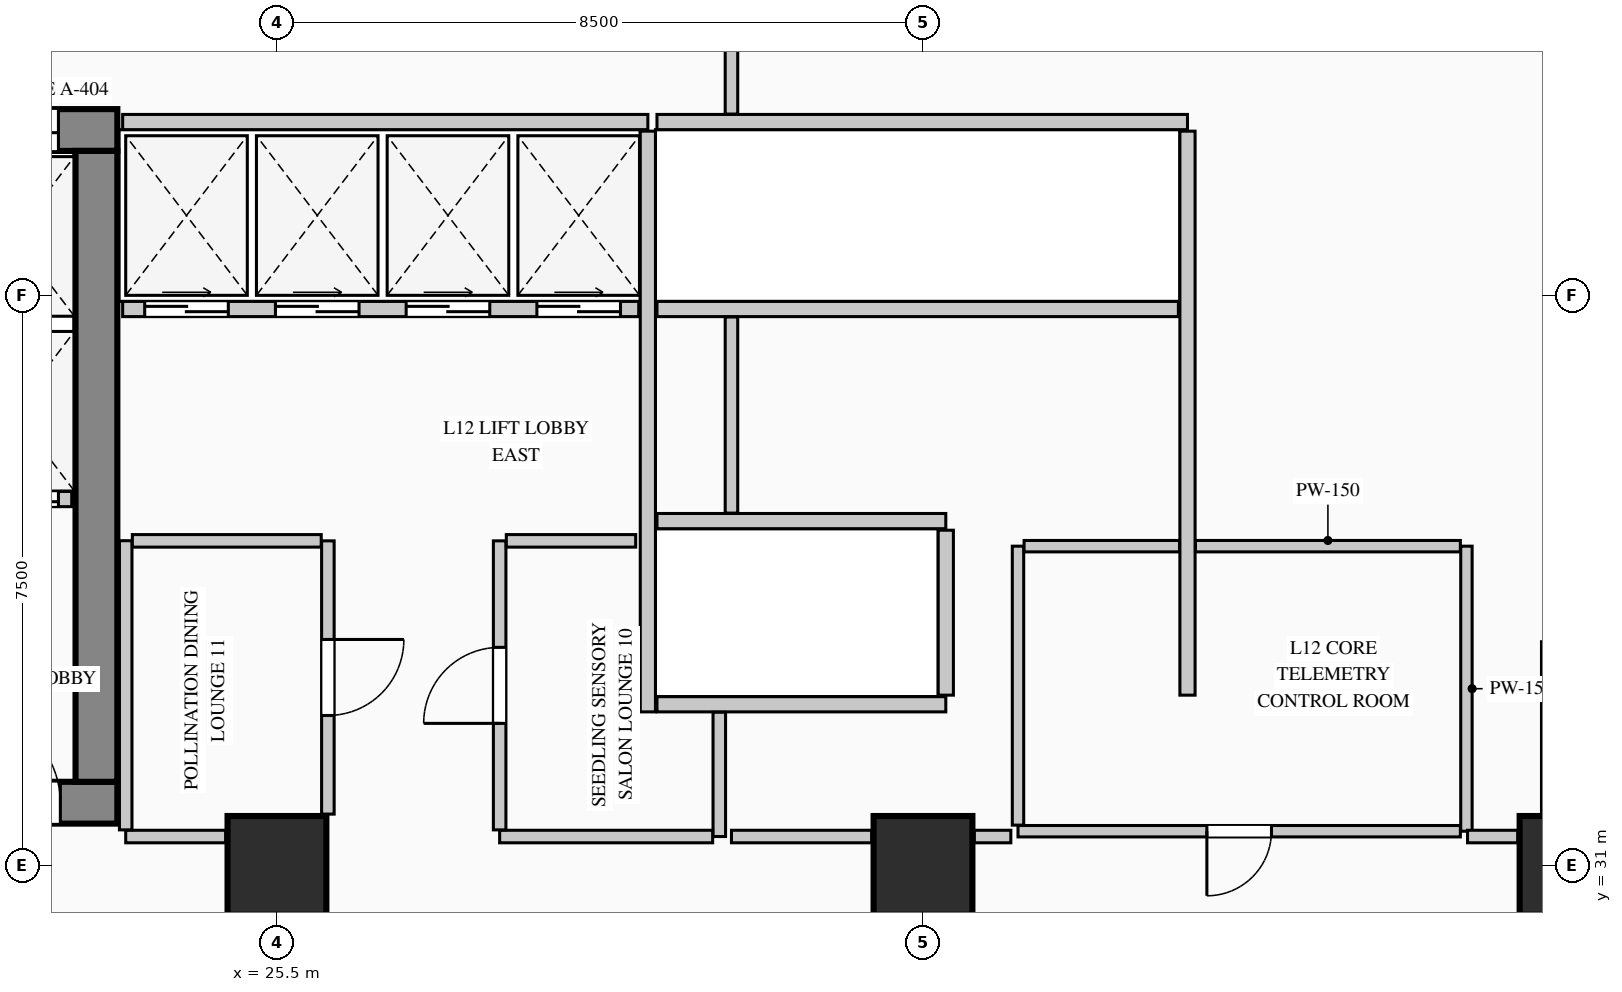
"""IFC4 building model, lengths in metres.
Left out: names, types, materials, properties, quantities, classifications, styles, units other than length and angle.
Written with IfcOpenShell. Run it as: python <this file> out.ifc"""

import sys

from ifc_helpers import new_model, si_unit, direction, frame, frame_2d, origin, origin_2d, place, context, subcontext, project, spatial, rectangle, extrude, element, fill, save


model = new_model("IFC4")
c1 = context("Model", 3, precision=1e-05, world=origin(), true_north=direction((0.0, 1.0)))
c2 = subcontext(c1, "Body", "Model", "MODEL_VIEW")
j1 = project(units=[si_unit("LENGTHUNIT", "METRE"), si_unit("PLANEANGLEUNIT", "RADIAN")], contexts=[c1])
p1 = place(None, origin())
s1 = spatial("IfcSite", under=j1, at=p1, CompositionType="ELEMENT")
p2 = place(p1, origin())
s2 = spatial("IfcBuilding", under=s1, at=p2, CompositionType="ELEMENT")
p3 = place(p2, frame((0.0, 0.0, 53.4)))
s3 = spatial("IfcBuildingStorey", under=s2, at=p3, CompositionType="ELEMENT", Elevation=53.4)
p4 = place(p3, frame((5.45, 40.675, 0.0), z_axis=(0.0, 0.0, 1.0), x_axis=(1.0, 0.0, 0.0)))
e1 = element("IfcWall", 1, at=p4, inside=s3, PredefinedType="SHEAR", context=c2, shape_type="SweptSolid", body=[
    extrude(rectangle(XDim=17.95, YDim=0.55, at=frame_2d((8.975, 0.0))), origin(), (0.0, 0.0, 1.0), 4.4),
])
p5 = place(p4, frame((15.995, 0.0, 0.0)))
e2 = element("IfcOpeningElement", 2, at=p5, cuts=e1, PredefinedType="OPENING", context=c2, shape_type="SweptSolid", body=[
    extrude(rectangle(XDim=1.18, YDim=2.25, at=frame_2d((0.59, 1.125))), frame((0.0, 0.285, 0.0), z_axis=(0.0, -1.0, 0.0), x_axis=(1.0, 0.0, 0.0)), (0.0, 0.0, 1.0), 0.57),
])
p6 = place(p3, frame((5.45, 31.825, 0.0), z_axis=(0.0, 0.0, 1.0), x_axis=(1.0, 0.0, 0.0)))
e3 = element("IfcWall", 3, at=p6, inside=s3, PredefinedType="SHEAR", context=c2, shape_type="SweptSolid", body=[
    extrude(rectangle(XDim=17.95, YDim=0.55, at=frame_2d((8.975, 0.0))), origin(), (0.0, 0.0, 1.0), 4.4),
])
p7 = place(p6, frame((3.2, 0.0, 0.0)))
e4 = element("IfcOpeningElement", 4, at=p7, cuts=e3, PredefinedType="OPENING", context=c2, shape_type="SweptSolid", body=[
    extrude(rectangle(XDim=1.2, YDim=2.2, at=frame_2d((0.6, 1.1))), frame((0.0, 0.285, 0.0), z_axis=(0.0, -1.0, 0.0), x_axis=(1.0, 0.0, 0.0)), (0.0, 0.0, 1.0), 0.57),
])
p8 = place(p6, frame((7.05, 0.0, 0.0)))
e5 = element("IfcOpeningElement", 5, at=p8, cuts=e3, PredefinedType="OPENING", context=c2, shape_type="SweptSolid", body=[
    extrude(rectangle(XDim=1.2, YDim=2.2, at=frame_2d((0.6, 1.1))), frame((0.0, 0.285, 0.0), z_axis=(0.0, -1.0, 0.0), x_axis=(1.0, 0.0, 0.0)), (0.0, 0.0, 1.0), 0.57),
])
p9 = place(p6, frame((8.9, 0.0, 0.0)))
e6 = element("IfcOpeningElement", 6, at=p9, cuts=e3, PredefinedType="OPENING", context=c2, shape_type="SweptSolid", body=[
    extrude(rectangle(XDim=1.15, YDim=2.2, at=frame_2d((0.575, 1.1))), frame((0.0, 0.285, 0.0), z_axis=(0.0, -1.0, 0.0), x_axis=(1.0, 0.0, 0.0)), (0.0, 0.0, 1.0), 0.57),
])
p10 = place(p6, frame((16.0, 0.0, 0.0)))
e7 = element("IfcOpeningElement", 7, at=p10, cuts=e3, PredefinedType="OPENING", context=c2, shape_type="SweptSolid", body=[
    extrude(rectangle(XDim=1.2, YDim=2.2, at=frame_2d((0.6, 1.1))), frame((0.0, 0.285, 0.0), z_axis=(0.0, -1.0, 0.0), x_axis=(1.0, 0.0, 0.0)), (0.0, 0.0, 1.0), 0.57),
])
p11 = place(p3, frame((23.125, 32.1, 0.0), z_axis=(0.0, 0.0, 1.0), x_axis=(0.0, 1.0, 0.0)))
e8 = element("IfcWall", 8, at=p11, inside=s3, PredefinedType="SHEAR", context=c2, shape_type="SweptSolid", body=[
    extrude(rectangle(XDim=8.3, YDim=0.55, at=frame_2d((4.15, 0.0))), origin(), (0.0, 0.0, 1.0), 4.4),
])
for number, where, z_axis, x_axis in (
    (9, (25.5, 31.0, 0.0), (0.0, 0.0, 1.0), (1.0, 0.0, 0.0)),
    (10, (34.0, 31.0, 0.0), (0.0, 0.0, 1.0), (1.0, 0.0, 0.0)),
    (11, (42.5, 31.0, 0.0), (0.0, 0.0, 1.0), (1.0, 0.0, 0.0)),
):
    element("IfcColumn", number, at=place(p3, frame(where, z_axis=z_axis, x_axis=x_axis)), inside=s3, PredefinedType="COLUMN", context=c2, shape_type="SweptSolid", body=[
        extrude(rectangle(XDim=1.3, YDim=1.3, at=origin_2d()), origin(), (0.0, 0.0, 1.0), 4.4),
    ])
p12 = place(p3, frame((21.3, 35.82, 0.0), z_axis=(0.0, 0.0, 1.0), x_axis=(1.0, 0.0, 0.0)))
e12 = element("IfcWall", 12, at=p12, inside=s3, PredefinedType="PARTITIONING", context=c2, shape_type="SweptSolid", body=[
    extrude(rectangle(XDim=1.5, YDim=0.2, at=frame_2d((0.75, 0.0))), origin(), (0.0, 0.0, 1.0), 4.1),
])
p13 = place(p12, frame((0.145, 0.0, 0.0)))
e13 = element("IfcOpeningElement", 13, at=p13, cuts=e12, PredefinedType="OPENING", context=c2, shape_type="SweptSolid", body=[
    extrude(rectangle(XDim=1.18, YDim=2.25, at=frame_2d((0.59, 1.125))), frame((0.0, 0.11, 0.0), z_axis=(0.0, -1.0, 0.0), x_axis=(1.0, 0.0, 0.0)), (0.0, 0.0, 1.0), 0.22),
])
p14 = place(p3, frame((23.47, 40.78, 0.0), z_axis=(0.0, 0.0, 1.0), x_axis=(1.0, 0.0, 0.0)))
e14 = element("IfcWall", 14, at=p14, inside=s3, PredefinedType="PARTITIONING", context=c2, shape_type="SweptSolid", body=[
    extrude(rectangle(XDim=6.91, YDim=0.2, at=frame_2d((3.455, 0.0))), origin(), (0.0, 0.0, 1.0), 4.1),
])
p15 = place(p3, frame((30.38, 33.02, 0.0), z_axis=(0.0, 0.0, 1.0), x_axis=(0.0, 1.0, 0.0)))
e15 = element("IfcWall", 15, at=p15, inside=s3, PredefinedType="PARTITIONING", context=c2, shape_type="SweptSolid", body=[
    extrude(rectangle(XDim=7.64, YDim=0.2, at=frame_2d((3.82, 0.0))), origin(), (0.0, 0.0, 1.0), 4.1),
])
p16 = place(p3, frame((23.47, 38.32, 0.0), z_axis=(0.0, 0.0, 1.0), x_axis=(1.0, 0.0, 0.0)))
e16 = element("IfcWall", 16, at=p16, inside=s3, PredefinedType="PARTITIONING", context=c2, shape_type="SweptSolid", body=[
    extrude(rectangle(XDim=6.79, YDim=0.2, at=frame_2d((3.395, 0.0))), origin(), (0.0, 0.0, 1.0), 4.1),
])
p17 = place(p16, frame((0.29, 0.0, 0.0)))
e17 = element("IfcOpeningElement", 17, at=p17, cuts=e16, PredefinedType="OPENING", context=c2, shape_type="SweptSolid", body=[
    extrude(rectangle(XDim=1.1, YDim=2.2, at=frame_2d((0.55, 1.1))), frame((0.0, 0.11, 0.0), z_axis=(0.0, -1.0, 0.0), x_axis=(1.0, 0.0, 0.0)), (0.0, 0.0, 1.0), 0.22),
])
p18 = place(p16, frame((2.01, 0.0, 0.0)))
e18 = element("IfcOpeningElement", 18, at=p18, cuts=e16, PredefinedType="OPENING", context=c2, shape_type="SweptSolid", body=[
    extrude(rectangle(XDim=1.1, YDim=2.2, at=frame_2d((0.55, 1.1))), frame((0.0, 0.11, 0.0), z_axis=(0.0, -1.0, 0.0), x_axis=(1.0, 0.0, 0.0)), (0.0, 0.0, 1.0), 0.22),
])
p19 = place(p16, frame((3.73, 0.0, 0.0)))
e19 = element("IfcOpeningElement", 19, at=p19, cuts=e16, PredefinedType="OPENING", context=c2, shape_type="SweptSolid", body=[
    extrude(rectangle(XDim=1.1, YDim=2.2, at=frame_2d((0.55, 1.1))), frame((0.0, 0.11, 0.0), z_axis=(0.0, -1.0, 0.0), x_axis=(1.0, 0.0, 0.0)), (0.0, 0.0, 1.0), 0.22),
])
p20 = place(p16, frame((5.45, 0.0, 0.0)))
e20 = element("IfcOpeningElement", 20, at=p20, cuts=e16, PredefinedType="OPENING", context=c2, shape_type="SweptSolid", body=[
    extrude(rectangle(XDim=1.1, YDim=2.2, at=frame_2d((0.55, 1.1))), frame((0.0, 0.11, 0.0), z_axis=(0.0, -1.0, 0.0), x_axis=(1.0, 0.0, 0.0)), (0.0, 0.0, 1.0), 0.22),
])
p21 = place(p3, frame((30.5, 40.78, 0.0), z_axis=(0.0, 0.0, 1.0), x_axis=(1.0, 0.0, 0.0)))
e21 = element("IfcWall", 21, at=p21, inside=s3, PredefinedType="PARTITIONING", context=c2, shape_type="SweptSolid", body=[
    extrude(rectangle(XDim=6.98, YDim=0.2, at=frame_2d((3.49, 0.0))), origin(), (0.0, 0.0, 1.0), 4.1),
])
p22 = place(p3, frame((37.48, 33.24, 0.0), z_axis=(0.0, 0.0, 1.0), x_axis=(0.0, 1.0, 0.0)))
e22 = element("IfcWall", 22, at=p22, inside=s3, PredefinedType="PARTITIONING", context=c2, shape_type="SweptSolid", body=[
    extrude(rectangle(XDim=7.42, YDim=0.2, at=frame_2d((3.71, 0.0))), origin(), (0.0, 0.0, 1.0), 4.1),
])
p23 = place(p3, frame((30.5, 38.32, 0.0), z_axis=(0.0, 0.0, 1.0), x_axis=(1.0, 0.0, 0.0)))
e23 = element("IfcWall", 23, at=p23, inside=s3, PredefinedType="PARTITIONING", context=c2, shape_type="SweptSolid", body=[
    extrude(rectangle(XDim=6.86, YDim=0.2, at=frame_2d((3.43, 0.0))), origin(), (0.0, 0.0, 1.0), 4.1),
])
for number, where, z_axis, x_axis in (
    (24, (30.5, 35.53, 0.0), (0.0, 0.0, 1.0), (1.0, 0.0, 0.0)),
    (25, (30.5, 33.12, 0.0), (0.0, 0.0, 1.0), (1.0, 0.0, 0.0)),
):
    element("IfcWall", number, at=place(p3, frame(where, z_axis=z_axis, x_axis=x_axis)), inside=s3, PredefinedType="PARTITIONING", context=c2, shape_type="SweptSolid", body=[
        extrude(rectangle(XDim=3.8, YDim=0.2, at=frame_2d((1.9, 0.0))), origin(), (0.0, 0.0, 1.0), 4.1),
    ])
p24 = place(p3, frame((34.3, 33.24, 0.0), z_axis=(0.0, 0.0, 1.0), x_axis=(0.0, 1.0, 0.0)))
e26 = element("IfcWall", 26, at=p24, inside=s3, PredefinedType="PARTITIONING", context=c2, shape_type="SweptSolid", body=[
    extrude(rectangle(XDim=2.17, YDim=0.2, at=frame_2d((1.085, 0.0))), origin(), (0.0, 0.0, 1.0), 4.1),
])
p25 = place(p3, frame((41.15, 35.2, 0.0), z_axis=(0.0, 0.0, 1.0), x_axis=(0.0, -1.0, 0.0)))
e27 = element("IfcWall", 27, at=p25, inside=s3, PredefinedType="PARTITIONING", context=c2, shape_type="SweptSolid", body=[
    extrude(rectangle(XDim=3.75, YDim=0.15, at=frame_2d((1.875, 0.0))), origin(), (0.0, 0.0, 1.0), 4.1),
])
p26 = place(p3, frame((41.07, 31.45, 0.0), z_axis=(0.0, 0.0, 1.0), x_axis=(-1.0, 0.0, 0.0)))
e28 = element("IfcWall", 28, at=p26, inside=s3, PredefinedType="PARTITIONING", context=c2, shape_type="SweptSolid", body=[
    extrude(rectangle(XDim=5.82, YDim=0.15, at=frame_2d((2.91, 0.0))), origin(), (0.0, 0.0, 1.0), 4.1),
])
p27 = place(p26, frame((2.485, 0.0, 0.0)))
e29 = element("IfcOpeningElement", 29, at=p27, cuts=e28, PredefinedType="OPENING", context=c2, shape_type="SweptSolid", body=[
    extrude(rectangle(XDim=0.85, YDim=2.1, at=frame_2d((0.425, 1.05))), frame((0.0, 0.085, 0.0), z_axis=(0.0, -1.0, 0.0), x_axis=(1.0, 0.0, 0.0)), (0.0, 0.0, 1.0), 0.17),
])
p28 = place(p3, frame((35.25, 31.53, 0.0), z_axis=(0.0, 0.0, 1.0), x_axis=(0.0, 1.0, 0.0)))
e30 = element("IfcWall", 30, at=p28, inside=s3, PredefinedType="PARTITIONING", context=c2, shape_type="SweptSolid", body=[
    extrude(rectangle(XDim=3.67, YDim=0.15, at=frame_2d((1.835, 0.0))), origin(), (0.0, 0.0, 1.0), 4.1),
])
p29 = place(p3, frame((35.33, 35.2, 0.0), z_axis=(0.0, 0.0, 1.0), x_axis=(1.0, 0.0, 0.0)))
e31 = element("IfcWall", 31, at=p29, inside=s3, PredefinedType="PARTITIONING", context=c2, shape_type="SweptSolid", body=[
    extrude(rectangle(XDim=2.045, YDim=0.15, at=frame_2d((1.022, 0.0))), origin(), (0.0, 0.0, 1.0), 4.1),
])
p30 = place(p3, frame((37.585, 35.2, 0.0), z_axis=(0.0, 0.0, 1.0), x_axis=(1.0, 0.0, 0.0)))
e32 = element("IfcWall", 32, at=p30, inside=s3, PredefinedType="PARTITIONING", context=c2, shape_type="SweptSolid", body=[
    extrude(rectangle(XDim=3.485, YDim=0.15, at=frame_2d((1.743, 0.0))), origin(), (0.0, 0.0, 1.0), 4.1),
])
p31 = place(p3, frame((31.32, 33.015, 0.0), z_axis=(0.0, 0.0, 1.0), x_axis=(0.0, -1.0, 0.0)))
e33 = element("IfcWall", 33, at=p31, inside=s3, PredefinedType="PARTITIONING", context=c2, shape_type="SweptSolid", body=[
    extrude(rectangle(XDim=1.635, YDim=0.165, at=frame_2d((0.817, 0.0))), origin(), (0.0, 0.0, 1.0), 4.1),
])
p32 = place(p3, frame((31.232, 31.38, 0.0), z_axis=(0.0, 0.0, 1.0), x_axis=(-1.0, 0.0, 0.0)))
e34 = element("IfcWall", 34, at=p32, inside=s3, PredefinedType="PARTITIONING", context=c2, shape_type="SweptSolid", body=[
    extrude(rectangle(XDim=2.802, YDim=0.165, at=frame_2d((1.401, 0.0))), origin(), (0.0, 0.0, 1.0), 4.1),
])
p33 = place(p3, frame((28.43, 31.468, 0.0), z_axis=(0.0, 0.0, 1.0), x_axis=(0.0, 1.0, 0.0)))
e35 = element("IfcWall", 35, at=p33, inside=s3, PredefinedType="PARTITIONING", context=c2, shape_type="SweptSolid", body=[
    extrude(rectangle(XDim=3.802, YDim=0.165, at=frame_2d((1.901, 0.0))), origin(), (0.0, 0.0, 1.0), 4.1),
])
p34 = place(p33, frame((1.401, 0.0, 0.0)))
e36 = element("IfcOpeningElement", 36, at=p34, cuts=e35, PredefinedType="OPENING", context=c2, shape_type="SweptSolid", body=[
    extrude(rectangle(XDim=1.0, YDim=2.15, at=frame_2d((0.5, 1.075))), frame((0.0, 0.093, 0.0), z_axis=(0.0, -1.0, 0.0), x_axis=(1.0, 0.0, 0.0)), (0.0, 0.0, 1.0), 0.185),
])
p35 = place(p3, frame((28.518, 35.27, 0.0), z_axis=(0.0, 0.0, 1.0), x_axis=(1.0, 0.0, 0.0)))
e37 = element("IfcWall", 37, at=p35, inside=s3, PredefinedType="PARTITIONING", context=c2, shape_type="SweptSolid", body=[
    extrude(rectangle(XDim=1.702, YDim=0.165, at=frame_2d((0.851, 0.0))), origin(), (0.0, 0.0, 1.0), 4.1),
])
p36 = place(p3, frame((26.17, 35.27, 0.0), z_axis=(0.0, 0.0, 1.0), x_axis=(0.0, -1.0, 0.0)))
e38 = element("IfcWall", 38, at=p36, inside=s3, PredefinedType="PARTITIONING", context=c2, shape_type="SweptSolid", body=[
    extrude(rectangle(XDim=3.595, YDim=0.165, at=frame_2d((1.797, 0.0))), origin(), (0.0, 0.0, 1.0), 4.1),
])
p37 = place(p36, frame((1.298, 0.0, 0.0)))
e39 = element("IfcOpeningElement", 39, at=p37, cuts=e38, PredefinedType="OPENING", context=c2, shape_type="SweptSolid", body=[
    extrude(rectangle(XDim=1.0, YDim=2.15, at=frame_2d((0.5, 1.075))), frame((0.0, 0.093, 0.0), z_axis=(0.0, -1.0, 0.0), x_axis=(1.0, 0.0, 0.0)), (0.0, 0.0, 1.0), 0.185),
])
p38 = place(p3, frame((24.825, 31.38, 0.0), z_axis=(0.0, 0.0, 1.0), x_axis=(-1.0, 0.0, 0.0)))
e40 = element("IfcWall", 40, at=p38, inside=s3, PredefinedType="PARTITIONING", context=c2, shape_type="SweptSolid", body=[
    extrude(rectangle(XDim=1.315, YDim=0.165, at=frame_2d((0.657, 0.0))), origin(), (0.0, 0.0, 1.0), 4.1),
])
p39 = place(p3, frame((23.51, 31.468, 0.0), z_axis=(0.0, 0.0, 1.0), x_axis=(0.0, 1.0, 0.0)))
e41 = element("IfcWall", 41, at=p39, inside=s3, PredefinedType="PARTITIONING", context=c2, shape_type="SweptSolid", body=[
    extrude(rectangle(XDim=3.804, YDim=0.165, at=frame_2d((1.902, 0.0))), origin(), (0.0, 0.0, 1.0), 4.1),
])
p40 = place(p3, frame((23.597, 35.27, 0.0), z_axis=(0.0, 0.0, 1.0), x_axis=(1.0, 0.0, 0.0)))
e42 = element("IfcWall", 42, at=p40, inside=s3, PredefinedType="PARTITIONING", context=c2, shape_type="SweptSolid", body=[
    extrude(rectangle(XDim=2.485, YDim=0.165, at=frame_2d((1.243, 0.0))), origin(), (0.0, 0.0, 1.0), 4.1),
])
p41 = place(p3, frame((31.48, 35.635, 0.0), z_axis=(0.0, 0.0, 1.0), x_axis=(0.0, 1.0, 0.0)))
e43 = element("IfcWall", 43, at=p41, inside=s3, PredefinedType="PARTITIONING", context=c2, shape_type="SweptSolid", body=[
    extrude(rectangle(XDim=2.58, YDim=0.165, at=frame_2d((1.29, 0.0))), origin(), (0.0, 0.0, 1.0), 4.1),
])
p42 = place(p3, frame((31.48, 40.885, 0.0), z_axis=(0.0, 0.0, 1.0), x_axis=(0.0, 1.0, 0.0)))
e44 = element("IfcWall", 44, at=p42, inside=s3, PredefinedType="PARTITIONING", context=c2, shape_type="SweptSolid", body=[
    extrude(rectangle(XDim=2.33, YDim=0.165, at=frame_2d((1.165, 0.0))), origin(), (0.0, 0.0, 1.0), 4.1),
])
p43 = place(p3, frame((42.22, 33.942, 0.0), z_axis=(0.0, 0.0, 1.0), x_axis=(0.0, -1.0, 0.0)))
e45 = element("IfcWall", 45, at=p43, inside=s3, PredefinedType="PARTITIONING", context=c2, shape_type="SweptSolid", body=[
    extrude(rectangle(XDim=2.267, YDim=0.165, at=frame_2d((1.134, 0.0))), origin(), (0.0, 0.0, 1.0), 4.1),
])
p44 = place(p3, frame((41.825, 31.38, 0.0), z_axis=(0.0, 0.0, 1.0), x_axis=(-1.0, 0.0, 0.0)))
e46 = element("IfcWall", 46, at=p44, inside=s3, PredefinedType="PARTITIONING", context=c2, shape_type="SweptSolid", body=[
    extrude(rectangle(XDim=0.66, YDim=0.165, at=frame_2d((0.33, 0.0))), origin(), (0.0, 0.0, 1.0), 4.1),
])
p45 = place(p3, frame((35.156, 31.38, 0.0), z_axis=(0.0, 0.0, 1.0), x_axis=(-1.0, 0.0, 0.0)))
e47 = element("IfcWall", 47, at=p45, inside=s3, PredefinedType="PARTITIONING", context=c2, shape_type="SweptSolid", body=[
    extrude(rectangle(XDim=0.48, YDim=0.165, at=frame_2d((0.24, 0.0))), origin(), (0.0, 0.0, 1.0), 4.1),
])
p46 = place(p3, frame((33.325, 31.38, 0.0), z_axis=(0.0, 0.0, 1.0), x_axis=(-1.0, 0.0, 0.0)))
e48 = element("IfcWall", 48, at=p46, inside=s3, PredefinedType="PARTITIONING", context=c2, shape_type="SweptSolid", body=[
    extrude(rectangle(XDim=1.845, YDim=0.165, at=frame_2d((0.922, 0.0))), origin(), (0.0, 0.0, 1.0), 4.1),
])
p47 = place(p10, origin())
e49 = element("IfcDoor", 49, at=p47, inside=s3, OperationType="SINGLE_SWING_LEFT", PredefinedType="DOOR", context=c2, shape_type="SweptSolid", body=[
    extrude(rectangle(XDim=1.2, YDim=2.2, at=frame_2d((0.6, 1.1))), frame((0.0, 0.025, 0.0), z_axis=(0.0, -1.0, 0.0), x_axis=(1.0, 0.0, 0.0)), (0.0, 0.0, 1.0), 0.05),
])
fill(e7, e49)
p48 = place(p5, origin())
e50 = element("IfcDoor", 50, at=p48, inside=s3, OperationType="DOUBLE_DOOR_SLIDING", PredefinedType="DOOR", context=c2, shape_type="SweptSolid", body=[
    extrude(rectangle(XDim=1.18, YDim=2.25, at=frame_2d((0.59, 1.125))), frame((0.0, 0.025, 0.0), z_axis=(0.0, -1.0, 0.0), x_axis=(1.0, 0.0, 0.0)), (0.0, 0.0, 1.0), 0.05),
])
fill(e2, e50)
p49 = place(p13, origin())
e51 = element("IfcDoor", 51, at=p49, inside=s3, OperationType="DOUBLE_DOOR_SLIDING", PredefinedType="DOOR", context=c2, shape_type="SweptSolid", body=[
    extrude(rectangle(XDim=1.18, YDim=2.25, at=frame_2d((0.59, 1.125))), frame((0.0, 0.025, 0.0), z_axis=(0.0, -1.0, 0.0), x_axis=(1.0, 0.0, 0.0)), (0.0, 0.0, 1.0), 0.05),
])
fill(e13, e51)
p50 = place(p17, origin())
e52 = element("IfcDoor", 52, at=p50, inside=s3, OperationType="DOUBLE_DOOR_SLIDING", PredefinedType="DOOR", context=c2, shape_type="SweptSolid", body=[
    extrude(rectangle(XDim=1.1, YDim=2.2, at=frame_2d((0.55, 1.1))), frame((0.0, 0.025, 0.0), z_axis=(0.0, -1.0, 0.0), x_axis=(1.0, 0.0, 0.0)), (0.0, 0.0, 1.0), 0.05),
])
fill(e17, e52)
p51 = place(p18, origin())
e53 = element("IfcDoor", 53, at=p51, inside=s3, OperationType="DOUBLE_DOOR_SLIDING", PredefinedType="DOOR", context=c2, shape_type="SweptSolid", body=[
    extrude(rectangle(XDim=1.1, YDim=2.2, at=frame_2d((0.55, 1.1))), frame((0.0, 0.025, 0.0), z_axis=(0.0, -1.0, 0.0), x_axis=(1.0, 0.0, 0.0)), (0.0, 0.0, 1.0), 0.05),
])
fill(e18, e53)
p52 = place(p19, origin())
e54 = element("IfcDoor", 54, at=p52, inside=s3, OperationType="DOUBLE_DOOR_SLIDING", PredefinedType="DOOR", context=c2, shape_type="SweptSolid", body=[
    extrude(rectangle(XDim=1.1, YDim=2.2, at=frame_2d((0.55, 1.1))), frame((0.0, 0.025, 0.0), z_axis=(0.0, -1.0, 0.0), x_axis=(1.0, 0.0, 0.0)), (0.0, 0.0, 1.0), 0.05),
])
fill(e19, e54)
p53 = place(p20, origin())
e55 = element("IfcDoor", 55, at=p53, inside=s3, OperationType="DOUBLE_DOOR_SLIDING", PredefinedType="DOOR", context=c2, shape_type="SweptSolid", body=[
    extrude(rectangle(XDim=1.1, YDim=2.2, at=frame_2d((0.55, 1.1))), frame((0.0, 0.025, 0.0), z_axis=(0.0, -1.0, 0.0), x_axis=(1.0, 0.0, 0.0)), (0.0, 0.0, 1.0), 0.05),
])
fill(e20, e55)
p54 = place(p27, origin())
e56 = element("IfcDoor", 56, at=p54, inside=s3, OperationType="SINGLE_SWING_RIGHT", PredefinedType="DOOR", context=c2, shape_type="SweptSolid", body=[
    extrude(rectangle(XDim=0.85, YDim=2.1, at=frame_2d((0.425, 1.05))), frame((0.0, 0.025, 0.0), z_axis=(0.0, -1.0, 0.0), x_axis=(1.0, 0.0, 0.0)), (0.0, 0.0, 1.0), 0.05),
])
fill(e29, e56)
p55 = place(p34, origin())
e57 = element("IfcDoor", 57, at=p55, inside=s3, OperationType="SINGLE_SWING_LEFT", PredefinedType="DOOR", context=c2, shape_type="SweptSolid", body=[
    extrude(rectangle(XDim=1.0, YDim=2.15, at=frame_2d((0.5, 1.075))), frame((0.0, 0.025, 0.0), z_axis=(0.0, -1.0, 0.0), x_axis=(1.0, 0.0, 0.0)), (0.0, 0.0, 1.0), 0.05),
])
fill(e36, e57)
p56 = place(p37, origin())
e58 = element("IfcDoor", 58, at=p56, inside=s3, OperationType="SINGLE_SWING_LEFT", PredefinedType="DOOR", context=c2, shape_type="SweptSolid", body=[
    extrude(rectangle(XDim=1.0, YDim=2.15, at=frame_2d((0.5, 1.075))), frame((0.0, 0.025, 0.0), z_axis=(0.0, -1.0, 0.0), x_axis=(1.0, 0.0, 0.0)), (0.0, 0.0, 1.0), 0.05),
])
fill(e39, e58)
save(model, sys.argv[1])
